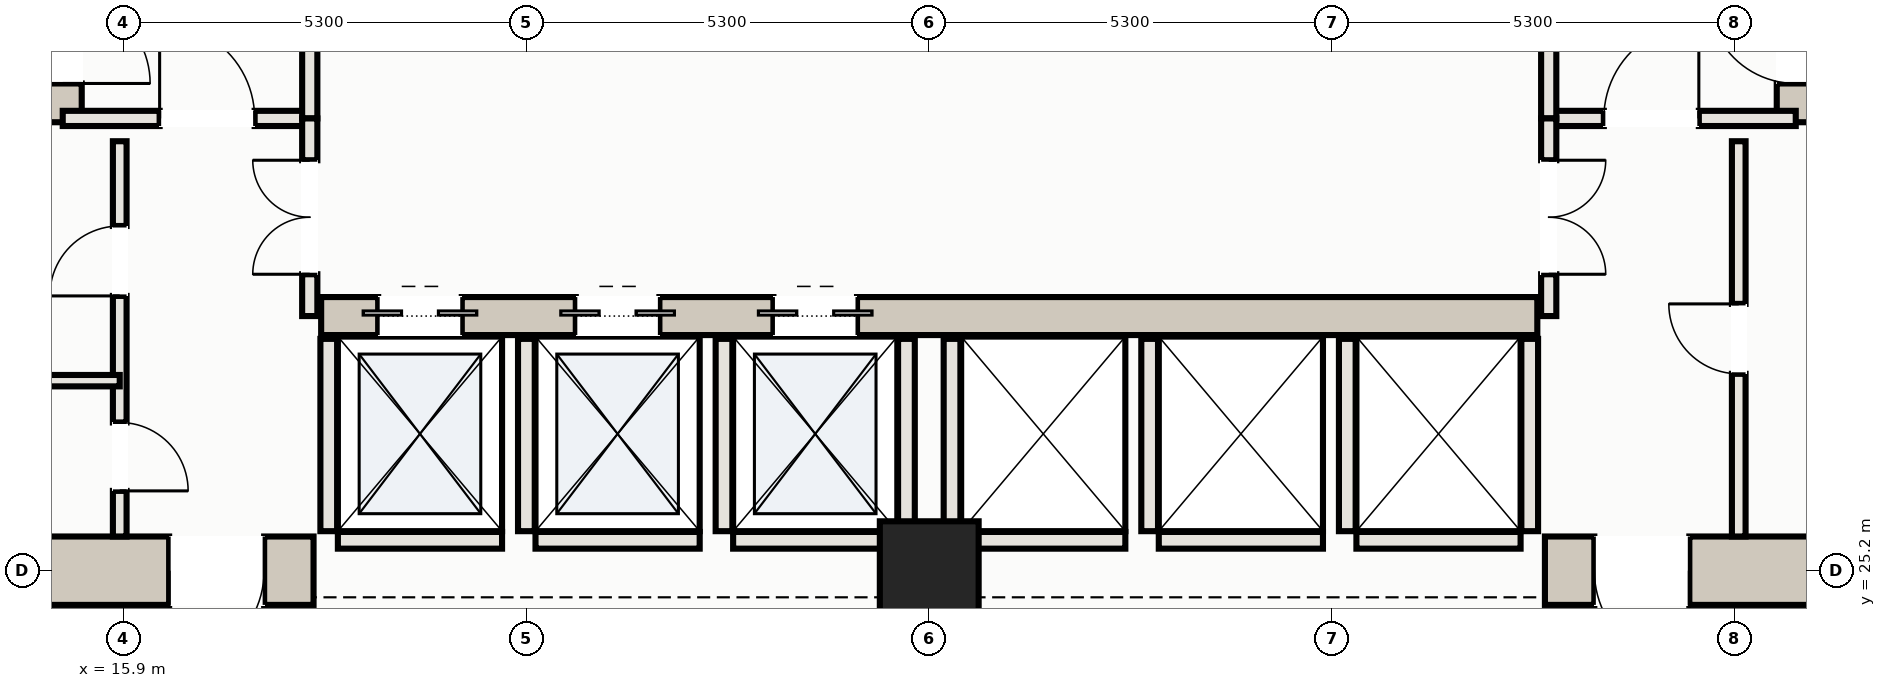
"""IFC4 building model, lengths in metres.
Left out: names, types, materials, properties, quantities, classifications, styles, units other than length and angle.
Written with IfcOpenShell. Run it as: python <this file> out.ifc"""

import sys

from ifc_helpers import new_model, si_unit, direction, frame, frame_2d, origin, origin_2d, place, context, subcontext, project, spatial, rectangle, hollow_rectangle, extrude, element, fill, save


model = new_model("IFC4")
c1 = context("Model", 3, precision=1e-05, world=origin(), true_north=direction((0.0, 1.0)))
c2 = subcontext(c1, "Body", "Model", "MODEL_VIEW")
j1 = project(units=[si_unit("LENGTHUNIT", "METRE"), si_unit("PLANEANGLEUNIT", "RADIAN")], contexts=[c1])
p1 = place(None, origin())
s1 = spatial("IfcSite", under=j1, at=p1, CompositionType="ELEMENT")
p2 = place(p1, origin())
s2 = spatial("IfcBuilding", under=s1, at=p2, CompositionType="ELEMENT")
p3 = place(p2, frame((0.0, 0.0, 5.2)))
s3 = spatial("IfcBuildingStorey", under=s2, at=p3, CompositionType="ELEMENT", Elevation=5.2)
p4 = place(p3, frame((10.15, 25.2, 0.0), z_axis=(0.0, 0.0, 1.0), x_axis=(1.0, 0.0, 0.0)))
e1 = element("IfcWall", 1, at=p4, inside=s3, PredefinedType="SHEAR", context=c2, shape_type="SweptSolid", body=[
    extrude(rectangle(XDim=8.25, YDim=0.9, at=frame_2d((4.125, 0.0))), origin(), (0.0, 0.0, 1.0), 4.35),
])
p5 = place(p4, frame((6.35, 0.0, 0.0)))
e2 = element("IfcOpeningElement", 2, at=p5, cuts=e1, PredefinedType="OPENING", context=c2, shape_type="SweptSolid", body=[
    extrude(rectangle(XDim=1.25, YDim=2.2, at=frame_2d((0.625, 1.1))), frame((0.0, 0.46, 0.0), z_axis=(0.0, -1.0, 0.0), x_axis=(1.0, 0.0, 0.0)), (0.0, 0.0, 1.0), 0.92),
])
p6 = place(p3, frame((34.6, 25.2, 0.0), z_axis=(0.0, 0.0, 1.0), x_axis=(1.0, 0.0, 0.0)))
e3 = element("IfcWall", 3, at=p6, inside=s3, PredefinedType="SHEAR", context=c2, shape_type="SweptSolid", body=[
    extrude(rectangle(XDim=8.25, YDim=0.9, at=frame_2d((4.125, 0.0))), origin(), (0.0, 0.0, 1.0), 4.35),
])
p7 = place(p6, frame((0.65, 0.0, 0.0)))
e4 = element("IfcOpeningElement", 4, at=p7, cuts=e3, PredefinedType="OPENING", context=c2, shape_type="SweptSolid", body=[
    extrude(rectangle(XDim=1.25, YDim=2.2, at=frame_2d((0.625, 1.1))), frame((0.0, 0.46, 0.0), z_axis=(0.0, -1.0, 0.0), x_axis=(1.0, 0.0, 0.0)), (0.0, 0.0, 1.0), 0.92),
])
p8 = place(p3, frame((15.1, 31.1, 0.0), z_axis=(0.0, 0.0, 1.0), x_axis=(0.0, 1.0, 0.0)))
e5 = element("IfcWall", 5, at=p8, inside=s3, PredefinedType="SHEAR", context=c2, shape_type="SweptSolid", body=[
    extrude(rectangle(XDim=8.45, YDim=0.5, at=frame_2d((4.225, 0.0))), origin(), (0.0, 0.0, 1.0), 4.35),
])
p9 = place(p8, frame((0.51, 0.0, 0.0)))
e6 = element("IfcOpeningElement", 6, at=p9, cuts=e5, PredefinedType="OPENING", context=c2, shape_type="SweptSolid", body=[
    extrude(rectangle(XDim=1.15, YDim=2.2, at=frame_2d((0.575, 1.1))), frame((0.0, 0.26, 0.0), z_axis=(0.0, -1.0, 0.0), x_axis=(1.0, 0.0, 0.0)), (0.0, 0.0, 1.0), 0.52),
])
p10 = place(p3, frame((37.9, 31.1, 0.0), z_axis=(0.0, 0.0, 1.0), x_axis=(0.0, 1.0, 0.0)))
e7 = element("IfcWall", 7, at=p10, inside=s3, PredefinedType="SHEAR", context=c2, shape_type="SweptSolid", body=[
    extrude(rectangle(XDim=8.45, YDim=0.5, at=frame_2d((4.225, 0.0))), origin(), (0.0, 0.0, 1.0), 4.35),
])
p11 = place(p10, frame((0.51, 0.0, 0.0)))
e8 = element("IfcOpeningElement", 8, at=p11, cuts=e7, PredefinedType="OPENING", context=c2, shape_type="SweptSolid", body=[
    extrude(rectangle(XDim=1.15, YDim=2.2, at=frame_2d((0.575, 1.1))), frame((0.0, 0.26, 0.0), z_axis=(0.0, -1.0, 0.0), x_axis=(1.0, 0.0, 0.0)), (0.0, 0.0, 1.0), 0.52),
])
p12 = place(p3, frame((18.5, 28.55, 0.0), z_axis=(0.0, 0.0, 1.0), x_axis=(1.0, 0.0, 0.0)))
e9 = element("IfcWall", 9, at=p12, inside=s3, PredefinedType="SHEAR", context=c2, shape_type="SweptSolid", body=[
    extrude(rectangle(XDim=16.0, YDim=0.5, at=frame_2d((8.0, 0.0))), origin(), (0.0, 0.0, 1.0), 4.35),
])
p13 = place(p12, frame((0.75, 0.0, 0.0)))
e10 = element("IfcOpeningElement", 10, at=p13, cuts=e9, PredefinedType="OPENING", context=c2, shape_type="SweptSolid", body=[
    extrude(rectangle(XDim=1.1, YDim=2.15, at=frame_2d((0.55, 1.075))), frame((0.0, 0.26, 0.0), z_axis=(0.0, -1.0, 0.0), x_axis=(1.0, 0.0, 0.0)), (0.0, 0.0, 1.0), 0.52),
])
p14 = place(p12, frame((3.35, 0.0, 0.0)))
e11 = element("IfcOpeningElement", 11, at=p14, cuts=e9, PredefinedType="OPENING", context=c2, shape_type="SweptSolid", body=[
    extrude(rectangle(XDim=1.1, YDim=2.15, at=frame_2d((0.55, 1.075))), frame((0.0, 0.26, 0.0), z_axis=(0.0, -1.0, 0.0), x_axis=(1.0, 0.0, 0.0)), (0.0, 0.0, 1.0), 0.52),
])
p15 = place(p12, frame((5.95, 0.0, 0.0)))
e12 = element("IfcOpeningElement", 12, at=p15, cuts=e9, PredefinedType="OPENING", context=c2, shape_type="SweptSolid", body=[
    extrude(rectangle(XDim=1.1, YDim=2.15, at=frame_2d((0.55, 1.075))), frame((0.0, 0.26, 0.0), z_axis=(0.0, -1.0, 0.0), x_axis=(1.0, 0.0, 0.0)), (0.0, 0.0, 1.0), 0.52),
])
p16 = place(p3, frame((26.5, 25.2, 0.0), z_axis=(0.0, 0.0, 1.0), x_axis=(1.0, 0.0, 0.0)))
e13 = element("IfcColumn", 13, at=p16, inside=s3, PredefinedType="COLUMN", context=c2, shape_type="SweptSolid", body=[
    extrude(hollow_rectangle(XDim=1.3, YDim=1.3, WallThickness=0.042, at=origin_2d()), origin(), (0.0, 0.0, 1.0), 4.6),
])
p17 = place(p3, frame((18.6, 25.72, 0.0), z_axis=(0.0, 0.0, 1.0), x_axis=(0.0, 1.0, 0.0)))
e14 = element("IfcWall", 14, at=p17, inside=s3, PredefinedType="SOLIDWALL", context=c2, shape_type="SweptSolid", body=[
    extrude(rectangle(XDim=2.53, YDim=0.22, at=frame_2d((1.265, 0.0))), origin(), (0.0, 0.0, 1.0), 4.35),
])
p18 = place(p3, frame((18.72, 25.6, 0.0), z_axis=(0.0, 0.0, 1.0), x_axis=(1.0, 0.0, 0.0)))
e15 = element("IfcWall", 15, at=p18, inside=s3, PredefinedType="SOLIDWALL", context=c2, shape_type="SweptSolid", body=[
    extrude(rectangle(XDim=2.16, YDim=0.22, at=frame_2d((1.08, 0.0))), origin(), (0.0, 0.0, 1.0), 4.35),
])
p19 = place(p3, frame((21.2, 25.72, 0.0), z_axis=(0.0, 0.0, 1.0), x_axis=(0.0, 1.0, 0.0)))
e16 = element("IfcWall", 16, at=p19, inside=s3, PredefinedType="SOLIDWALL", context=c2, shape_type="SweptSolid", body=[
    extrude(rectangle(XDim=2.53, YDim=0.22, at=frame_2d((1.265, 0.0))), origin(), (0.0, 0.0, 1.0), 4.35),
])
p20 = place(p3, frame((21.32, 25.6, 0.0), z_axis=(0.0, 0.0, 1.0), x_axis=(1.0, 0.0, 0.0)))
e17 = element("IfcWall", 17, at=p20, inside=s3, PredefinedType="SOLIDWALL", context=c2, shape_type="SweptSolid", body=[
    extrude(rectangle(XDim=2.16, YDim=0.22, at=frame_2d((1.08, 0.0))), origin(), (0.0, 0.0, 1.0), 4.35),
])
for number, where, z_axis, x_axis in (
    (18, (23.8, 25.72, 0.0), (0.0, 0.0, 1.0), (0.0, 1.0, 0.0)),
    (19, (26.2, 25.72, 0.0), (0.0, 0.0, 1.0), (0.0, 1.0, 0.0)),
):
    element("IfcWall", number, at=place(p3, frame(where, z_axis=z_axis, x_axis=x_axis)), inside=s3, PredefinedType="SOLIDWALL", context=c2, shape_type="SweptSolid", body=[
        extrude(rectangle(XDim=2.53, YDim=0.22, at=frame_2d((1.265, 0.0))), origin(), (0.0, 0.0, 1.0), 4.35),
    ])
p21 = place(p3, frame((23.92, 25.6, 0.0), z_axis=(0.0, 0.0, 1.0), x_axis=(1.0, 0.0, 0.0)))
e20 = element("IfcWall", 20, at=p21, inside=s3, PredefinedType="SOLIDWALL", context=c2, shape_type="SweptSolid", body=[
    extrude(rectangle(XDim=2.16, YDim=0.22, at=frame_2d((1.08, 0.0))), origin(), (0.0, 0.0, 1.0), 4.35),
])
p22 = place(p3, frame((26.8, 25.72, 0.0), z_axis=(0.0, 0.0, 1.0), x_axis=(0.0, 1.0, 0.0)))
e21 = element("IfcWall", 21, at=p22, inside=s3, PredefinedType="SOLIDWALL", context=c2, shape_type="SweptSolid", body=[
    extrude(rectangle(XDim=2.53, YDim=0.22, at=frame_2d((1.265, 0.0))), origin(), (0.0, 0.0, 1.0), 4.35),
])
p23 = place(p3, frame((26.92, 25.6, 0.0), z_axis=(0.0, 0.0, 1.0), x_axis=(1.0, 0.0, 0.0)))
e22 = element("IfcWall", 22, at=p23, inside=s3, PredefinedType="SOLIDWALL", context=c2, shape_type="SweptSolid", body=[
    extrude(rectangle(XDim=2.16, YDim=0.22, at=frame_2d((1.08, 0.0))), origin(), (0.0, 0.0, 1.0), 4.35),
])
p24 = place(p3, frame((29.4, 25.72, 0.0), z_axis=(0.0, 0.0, 1.0), x_axis=(0.0, 1.0, 0.0)))
e23 = element("IfcWall", 23, at=p24, inside=s3, PredefinedType="SOLIDWALL", context=c2, shape_type="SweptSolid", body=[
    extrude(rectangle(XDim=2.53, YDim=0.22, at=frame_2d((1.265, 0.0))), origin(), (0.0, 0.0, 1.0), 4.35),
])
p25 = place(p3, frame((29.52, 25.6, 0.0), z_axis=(0.0, 0.0, 1.0), x_axis=(1.0, 0.0, 0.0)))
e24 = element("IfcWall", 24, at=p25, inside=s3, PredefinedType="SOLIDWALL", context=c2, shape_type="SweptSolid", body=[
    extrude(rectangle(XDim=2.16, YDim=0.22, at=frame_2d((1.08, 0.0))), origin(), (0.0, 0.0, 1.0), 4.35),
])
for number, where, z_axis, x_axis in (
    (25, (32.0, 25.72, 0.0), (0.0, 0.0, 1.0), (0.0, 1.0, 0.0)),
    (26, (34.4, 25.72, 0.0), (0.0, 0.0, 1.0), (0.0, 1.0, 0.0)),
):
    element("IfcWall", number, at=place(p3, frame(where, z_axis=z_axis, x_axis=x_axis)), inside=s3, PredefinedType="SOLIDWALL", context=c2, shape_type="SweptSolid", body=[
        extrude(rectangle(XDim=2.53, YDim=0.22, at=frame_2d((1.265, 0.0))), origin(), (0.0, 0.0, 1.0), 4.35),
    ])
p26 = place(p3, frame((32.12, 25.6, 0.0), z_axis=(0.0, 0.0, 1.0), x_axis=(1.0, 0.0, 0.0)))
e27 = element("IfcWall", 27, at=p26, inside=s3, PredefinedType="SOLIDWALL", context=c2, shape_type="SweptSolid", body=[
    extrude(rectangle(XDim=2.16, YDim=0.22, at=frame_2d((1.08, 0.0))), origin(), (0.0, 0.0, 1.0), 4.35),
])
p27 = place(p3, frame((15.1, 31.15, 0.0), z_axis=(0.0, 0.0, 1.0), x_axis=(1.0, 0.0, 0.0)))
e28 = element("IfcWall", 28, at=p27, inside=s3, PredefinedType="PARTITIONING", context=c2, shape_type="SweptSolid", body=[
    extrude(rectangle(XDim=3.25, YDim=0.2, at=frame_2d((1.625, 0.0))), origin(), (0.0, 0.0, 1.0), 4.35),
])
p28 = place(p27, frame((1.275, 0.0, 0.0)))
e29 = element("IfcOpeningElement", 29, at=p28, cuts=e28, PredefinedType="OPENING", context=c2, shape_type="SweptSolid", body=[
    extrude(rectangle(XDim=1.25, YDim=2.2, at=frame_2d((0.625, 1.1))), frame((0.0, 0.11, 0.0), z_axis=(0.0, -1.0, 0.0), x_axis=(1.0, 0.0, 0.0)), (0.0, 0.0, 1.0), 0.22),
])
p29 = place(p3, frame((18.35, 31.15, 0.0), z_axis=(0.0, 0.0, 1.0), x_axis=(0.0, 1.0, 0.0)))
e30 = element("IfcWall", 30, at=p29, inside=s3, PredefinedType="PARTITIONING", context=c2, shape_type="SweptSolid", body=[
    extrude(rectangle(XDim=5.15, YDim=0.2, at=frame_2d((2.575, 0.0))), origin(), (0.0, 0.0, 1.0), 4.35),
])
p30 = place(p29, frame((1.875, 0.0, 0.0)))
e31 = element("IfcOpeningElement", 31, at=p30, cuts=e30, PredefinedType="OPENING", context=c2, shape_type="SweptSolid", body=[
    extrude(rectangle(XDim=1.25, YDim=2.2, at=frame_2d((0.625, 1.1))), frame((0.0, 0.11, 0.0), z_axis=(0.0, -1.0, 0.0), x_axis=(1.0, 0.0, 0.0)), (0.0, 0.0, 1.0), 0.22),
])
p31 = place(p3, frame((34.65, 31.15, 0.0), z_axis=(0.0, 0.0, 1.0), x_axis=(1.0, 0.0, 0.0)))
e32 = element("IfcWall", 32, at=p31, inside=s3, PredefinedType="PARTITIONING", context=c2, shape_type="SweptSolid", body=[
    extrude(rectangle(XDim=3.25, YDim=0.2, at=frame_2d((1.625, 0.0))), origin(), (0.0, 0.0, 1.0), 4.35),
])
p32 = place(p31, frame((0.725, 0.0, 0.0)))
e33 = element("IfcOpeningElement", 33, at=p32, cuts=e32, PredefinedType="OPENING", context=c2, shape_type="SweptSolid", body=[
    extrude(rectangle(XDim=1.25, YDim=2.2, at=frame_2d((0.625, 1.1))), frame((0.0, 0.11, 0.0), z_axis=(0.0, -1.0, 0.0), x_axis=(1.0, 0.0, 0.0)), (0.0, 0.0, 1.0), 0.22),
])
p33 = place(p3, frame((34.65, 31.15, 0.0), z_axis=(0.0, 0.0, 1.0), x_axis=(0.0, 1.0, 0.0)))
e34 = element("IfcWall", 34, at=p33, inside=s3, PredefinedType="PARTITIONING", context=c2, shape_type="SweptSolid", body=[
    extrude(rectangle(XDim=5.15, YDim=0.2, at=frame_2d((2.575, 0.0))), origin(), (0.0, 0.0, 1.0), 4.35),
])
p34 = place(p33, frame((1.875, 0.0, 0.0)))
e35 = element("IfcOpeningElement", 35, at=p34, cuts=e34, PredefinedType="OPENING", context=c2, shape_type="SweptSolid", body=[
    extrude(rectangle(XDim=1.25, YDim=2.2, at=frame_2d((0.625, 1.1))), frame((0.0, 0.11, 0.0), z_axis=(0.0, -1.0, 0.0), x_axis=(1.0, 0.0, 0.0)), (0.0, 0.0, 1.0), 0.22),
])
p35 = place(p3, frame((15.85, 25.65, 0.0), z_axis=(0.0, 0.0, 1.0), x_axis=(0.0, 1.0, 0.0)))
e36 = element("IfcWall", 36, at=p35, inside=s3, PredefinedType="PARTITIONING", context=c2, shape_type="SweptSolid", body=[
    extrude(rectangle(XDim=5.2, YDim=0.18, at=frame_2d((2.6, 0.0))), origin(), (0.0, 0.0, 1.0), 4.35),
])
p36 = place(p35, frame((0.6, 0.0, 0.0)))
e37 = element("IfcOpeningElement", 37, at=p36, cuts=e36, PredefinedType="OPENING", context=c2, shape_type="SweptSolid", body=[
    extrude(rectangle(XDim=0.9, YDim=2.15, at=frame_2d((0.45, 1.075))), frame((0.0, 0.1, 0.0), z_axis=(0.0, -1.0, 0.0), x_axis=(1.0, 0.0, 0.0)), (0.0, 0.0, 1.0), 0.2),
])
p37 = place(p35, frame((3.165, 0.0, 0.0)))
e38 = element("IfcOpeningElement", 38, at=p37, cuts=e36, PredefinedType="OPENING", context=c2, shape_type="SweptSolid", body=[
    extrude(rectangle(XDim=0.92, YDim=2.15, at=frame_2d((0.46, 1.075))), frame((0.0, 0.1, 0.0), z_axis=(0.0, -1.0, 0.0), x_axis=(1.0, 0.0, 0.0)), (0.0, 0.0, 1.0), 0.2),
])
p38 = place(p3, frame((37.15, 25.65, 0.0), z_axis=(0.0, 0.0, 1.0), x_axis=(0.0, 1.0, 0.0)))
e39 = element("IfcWall", 39, at=p38, inside=s3, PredefinedType="PARTITIONING", context=c2, shape_type="SweptSolid", body=[
    extrude(rectangle(XDim=5.2, YDim=0.18, at=frame_2d((2.6, 0.0))), origin(), (0.0, 0.0, 1.0), 4.35),
])
p39 = place(p38, frame((2.14, 0.0, 0.0)))
e40 = element("IfcOpeningElement", 40, at=p39, cuts=e39, PredefinedType="OPENING", context=c2, shape_type="SweptSolid", body=[
    extrude(rectangle(XDim=0.92, YDim=2.15, at=frame_2d((0.46, 1.075))), frame((0.0, 0.1, 0.0), z_axis=(0.0, -1.0, 0.0), x_axis=(1.0, 0.0, 0.0)), (0.0, 0.0, 1.0), 0.2),
])
p40 = place(p3, frame((11.05, 27.7, 0.0), z_axis=(0.0, 0.0, 1.0), x_axis=(1.0, 0.0, 0.0)))
e41 = element("IfcWall", 41, at=p40, inside=s3, PredefinedType="PARTITIONING", context=c2, shape_type="SweptSolid", body=[
    extrude(rectangle(XDim=4.8, YDim=0.15, at=frame_2d((2.4, 0.0))), origin(), (0.0, 0.0, 1.0), 4.35),
])
p41 = place(p3, frame((18.35, 28.55, 0.0), z_axis=(0.0, 0.0, 1.0), x_axis=(0.0, 1.0, 0.0)))
e42 = element("IfcWall", 42, at=p41, inside=s3, PredefinedType="PARTITIONING", context=c2, shape_type="SweptSolid", body=[
    extrude(rectangle(XDim=2.6, YDim=0.2, at=frame_2d((1.3, 0.0))), origin(), (0.0, 0.0, 1.0), 4.35),
])
p42 = place(p41, frame((0.55, 0.0, 0.0)))
e43 = element("IfcOpeningElement", 43, at=p42, cuts=e42, PredefinedType="OPENING", context=c2, shape_type="SweptSolid", body=[
    extrude(rectangle(XDim=1.5, YDim=2.25, at=frame_2d((0.75, 1.125))), frame((0.0, 0.11, 0.0), z_axis=(0.0, -1.0, 0.0), x_axis=(1.0, 0.0, 0.0)), (0.0, 0.0, 1.0), 0.22),
])
p43 = place(p3, frame((34.65, 28.55, 0.0), z_axis=(0.0, 0.0, 1.0), x_axis=(0.0, 1.0, 0.0)))
e44 = element("IfcWall", 44, at=p43, inside=s3, PredefinedType="PARTITIONING", context=c2, shape_type="SweptSolid", body=[
    extrude(rectangle(XDim=2.6, YDim=0.2, at=frame_2d((1.3, 0.0))), origin(), (0.0, 0.0, 1.0), 4.35),
])
p44 = place(p43, frame((0.55, 0.0, 0.0)))
e45 = element("IfcOpeningElement", 45, at=p44, cuts=e44, PredefinedType="OPENING", context=c2, shape_type="SweptSolid", body=[
    extrude(rectangle(XDim=1.5, YDim=2.25, at=frame_2d((0.75, 1.125))), frame((0.0, 0.11, 0.0), z_axis=(0.0, -1.0, 0.0), x_axis=(1.0, 0.0, 0.0)), (0.0, 0.0, 1.0), 0.22),
])
p45 = place(p13, origin())
e46 = element("IfcDoor", 46, at=p45, inside=s3, OperationType="DOUBLE_DOOR_SLIDING", PredefinedType="DOOR", context=c2, shape_type="SweptSolid", body=[
    extrude(rectangle(XDim=1.1, YDim=2.15, at=frame_2d((0.55, 1.075))), frame((0.0, 0.025, 0.0), z_axis=(0.0, -1.0, 0.0), x_axis=(1.0, 0.0, 0.0)), (0.0, 0.0, 1.0), 0.05),
])
fill(e10, e46)
p46 = place(p14, origin())
e47 = element("IfcDoor", 47, at=p46, inside=s3, OperationType="DOUBLE_DOOR_SLIDING", PredefinedType="DOOR", context=c2, shape_type="SweptSolid", body=[
    extrude(rectangle(XDim=1.1, YDim=2.15, at=frame_2d((0.55, 1.075))), frame((0.0, 0.025, 0.0), z_axis=(0.0, -1.0, 0.0), x_axis=(1.0, 0.0, 0.0)), (0.0, 0.0, 1.0), 0.05),
])
fill(e11, e47)
p47 = place(p15, origin())
e48 = element("IfcDoor", 48, at=p47, inside=s3, OperationType="DOUBLE_DOOR_SLIDING", PredefinedType="DOOR", context=c2, shape_type="SweptSolid", body=[
    extrude(rectangle(XDim=1.1, YDim=2.15, at=frame_2d((0.55, 1.075))), frame((0.0, 0.025, 0.0), z_axis=(0.0, -1.0, 0.0), x_axis=(1.0, 0.0, 0.0)), (0.0, 0.0, 1.0), 0.05),
])
fill(e12, e48)
p48 = place(p5, frame((1.25, 0.0, 0.0), z_axis=(0.0, 0.0, 1.0), x_axis=(-1.0, 0.0, 0.0)))
e49 = element("IfcDoor", 49, at=p48, inside=s3, OperationType="SINGLE_SWING_RIGHT", PredefinedType="DOOR", context=c2, shape_type="SweptSolid", body=[
    extrude(rectangle(XDim=1.25, YDim=2.2, at=frame_2d((0.625, 1.1))), frame((0.0, 0.025, 0.0), z_axis=(0.0, -1.0, 0.0), x_axis=(1.0, 0.0, 0.0)), (0.0, 0.0, 1.0), 0.05),
])
fill(e2, e49)
p49 = place(p7, frame((1.25, 0.0, 0.0), z_axis=(0.0, 0.0, 1.0), x_axis=(-1.0, 0.0, 0.0)))
e50 = element("IfcDoor", 50, at=p49, inside=s3, OperationType="SINGLE_SWING_LEFT", PredefinedType="DOOR", context=c2, shape_type="SweptSolid", body=[
    extrude(rectangle(XDim=1.25, YDim=2.2, at=frame_2d((0.625, 1.1))), frame((0.0, 0.025, 0.0), z_axis=(0.0, -1.0, 0.0), x_axis=(1.0, 0.0, 0.0)), (0.0, 0.0, 1.0), 0.05),
])
fill(e4, e50)
p50 = place(p28, origin())
e51 = element("IfcDoor", 51, at=p50, inside=s3, OperationType="SINGLE_SWING_LEFT", PredefinedType="DOOR", context=c2, shape_type="SweptSolid", body=[
    extrude(rectangle(XDim=1.25, YDim=2.2, at=frame_2d((0.625, 1.1))), frame((0.0, 0.025, 0.0), z_axis=(0.0, -1.0, 0.0), x_axis=(1.0, 0.0, 0.0)), (0.0, 0.0, 1.0), 0.05),
])
fill(e29, e51)
p51 = place(p32, origin())
e52 = element("IfcDoor", 52, at=p51, inside=s3, OperationType="SINGLE_SWING_RIGHT", PredefinedType="DOOR", context=c2, shape_type="SweptSolid", body=[
    extrude(rectangle(XDim=1.25, YDim=2.2, at=frame_2d((0.625, 1.1))), frame((0.0, 0.025, 0.0), z_axis=(0.0, -1.0, 0.0), x_axis=(1.0, 0.0, 0.0)), (0.0, 0.0, 1.0), 0.05),
])
fill(e33, e52)
p52 = place(p9, frame((1.15, 0.0, 0.0), z_axis=(0.0, 0.0, 1.0), x_axis=(-1.0, 0.0, 0.0)))
e53 = element("IfcDoor", 53, at=p52, inside=s3, OperationType="SINGLE_SWING_RIGHT", PredefinedType="DOOR", context=c2, shape_type="SweptSolid", body=[
    extrude(rectangle(XDim=1.15, YDim=2.2, at=frame_2d((0.575, 1.1))), frame((0.0, 0.025, 0.0), z_axis=(0.0, -1.0, 0.0), x_axis=(1.0, 0.0, 0.0)), (0.0, 0.0, 1.0), 0.05),
])
fill(e6, e53)
p53 = place(p11, origin())
e54 = element("IfcDoor", 54, at=p53, inside=s3, OperationType="SINGLE_SWING_RIGHT", PredefinedType="DOOR", context=c2, shape_type="SweptSolid", body=[
    extrude(rectangle(XDim=1.15, YDim=2.2, at=frame_2d((0.575, 1.1))), frame((0.0, 0.025, 0.0), z_axis=(0.0, -1.0, 0.0), x_axis=(1.0, 0.0, 0.0)), (0.0, 0.0, 1.0), 0.05),
])
fill(e8, e54)
p54 = place(p36, frame((0.9, 0.0, 0.0), z_axis=(0.0, 0.0, 1.0), x_axis=(-1.0, 0.0, 0.0)))
e55 = element("IfcDoor", 55, at=p54, inside=s3, OperationType="SINGLE_SWING_RIGHT", PredefinedType="DOOR", context=c2, shape_type="SweptSolid", body=[
    extrude(rectangle(XDim=0.9, YDim=2.15, at=frame_2d((0.45, 1.075))), frame((0.0, 0.025, 0.0), z_axis=(0.0, -1.0, 0.0), x_axis=(1.0, 0.0, 0.0)), (0.0, 0.0, 1.0), 0.05),
])
fill(e37, e55)
p55 = place(p37, origin())
e56 = element("IfcDoor", 56, at=p55, inside=s3, OperationType="SINGLE_SWING_LEFT", PredefinedType="DOOR", context=c2, shape_type="SweptSolid", body=[
    extrude(rectangle(XDim=0.92, YDim=2.15, at=frame_2d((0.46, 1.075))), frame((0.0, 0.025, 0.0), z_axis=(0.0, -1.0, 0.0), x_axis=(1.0, 0.0, 0.0)), (0.0, 0.0, 1.0), 0.05),
])
fill(e38, e56)
p56 = place(p39, origin())
e57 = element("IfcDoor", 57, at=p56, inside=s3, OperationType="SINGLE_SWING_RIGHT", PredefinedType="DOOR", context=c2, shape_type="SweptSolid", body=[
    extrude(rectangle(XDim=0.92, YDim=2.15, at=frame_2d((0.46, 1.075))), frame((0.0, 0.025, 0.0), z_axis=(0.0, -1.0, 0.0), x_axis=(1.0, 0.0, 0.0)), (0.0, 0.0, 1.0), 0.05),
])
fill(e40, e57)
p57 = place(p42, origin())
e58 = element("IfcDoor", 58, at=p57, inside=s3, OperationType="DOUBLE_DOOR_SINGLE_SWING", PredefinedType="DOOR", context=c2, shape_type="SweptSolid", body=[
    extrude(rectangle(XDim=1.5, YDim=2.25, at=frame_2d((0.75, 1.125))), frame((0.0, 0.025, 0.0), z_axis=(0.0, -1.0, 0.0), x_axis=(1.0, 0.0, 0.0)), (0.0, 0.0, 1.0), 0.05),
])
fill(e43, e58)
p58 = place(p44, frame((1.5, 0.0, 0.0), z_axis=(0.0, 0.0, 1.0), x_axis=(-1.0, 0.0, 0.0)))
e59 = element("IfcDoor", 59, at=p58, inside=s3, OperationType="DOUBLE_DOOR_SINGLE_SWING", PredefinedType="DOOR", context=c2, shape_type="SweptSolid", body=[
    extrude(rectangle(XDim=1.5, YDim=2.25, at=frame_2d((0.75, 1.125))), frame((0.0, 0.025, 0.0), z_axis=(0.0, -1.0, 0.0), x_axis=(1.0, 0.0, 0.0)), (0.0, 0.0, 1.0), 0.05),
])
fill(e45, e59)
save(model, sys.argv[1])
